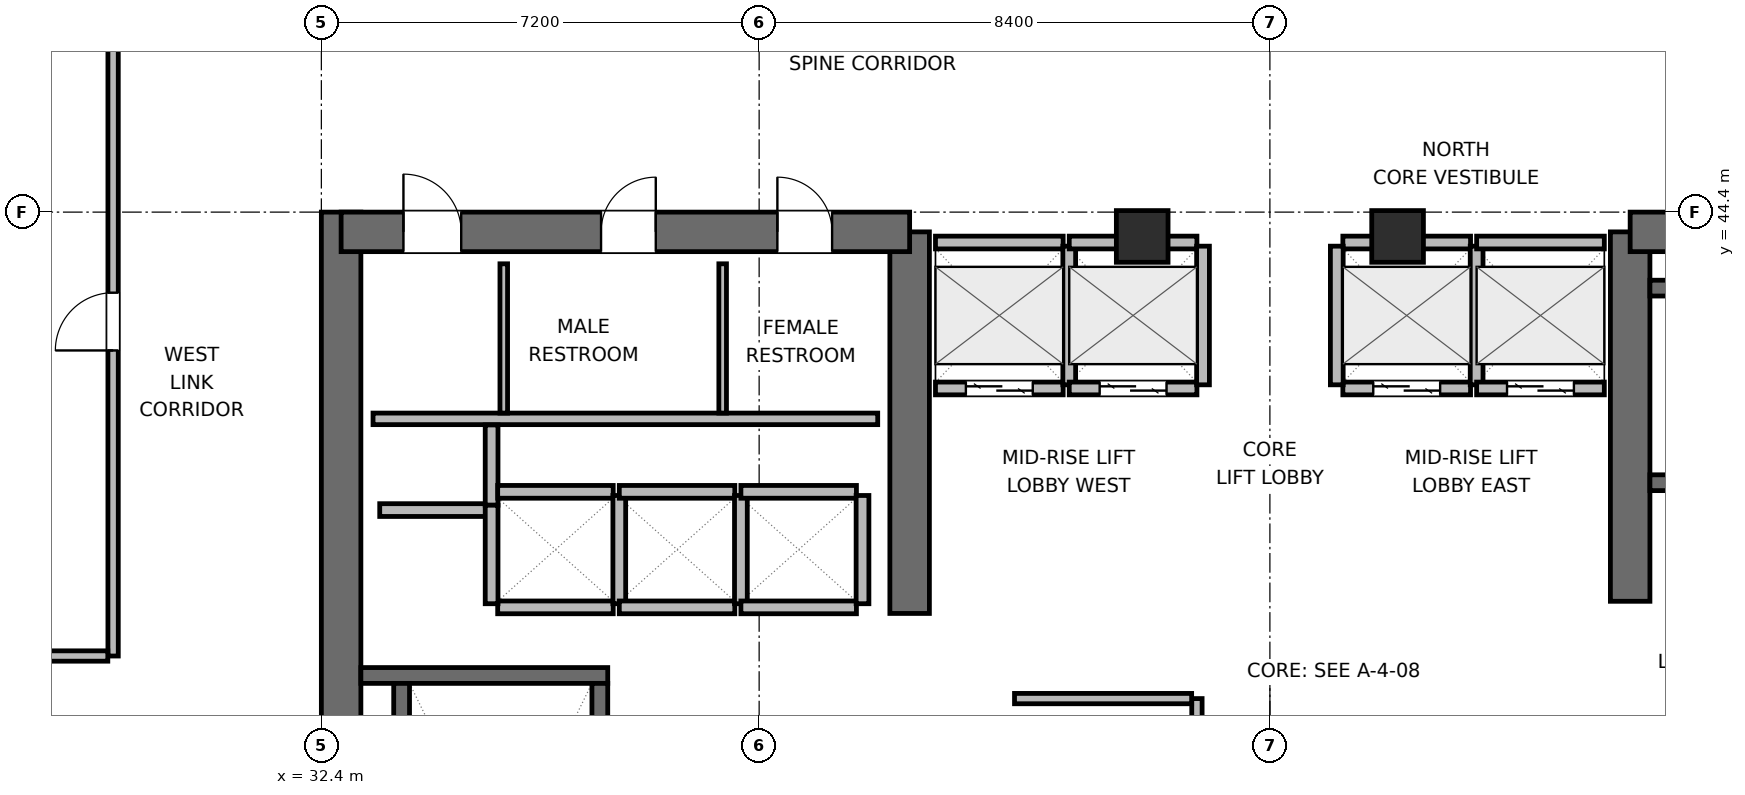
"""IFC4 building model, lengths in metres.
Left out: names, types, materials, properties, quantities, classifications, styles, units other than length and angle.
Written with IfcOpenShell. Run it as: python <this file> out.ifc"""

import sys

from ifc_helpers import new_model, si_unit, direction, frame, frame_2d, origin, origin_2d, place, context, subcontext, project, spatial, rectangle, extrude, element, fill, save


model = new_model("IFC4")
c1 = context("Model", 3, precision=1e-05, world=origin(), true_north=direction((0.0, 1.0)))
c2 = subcontext(c1, "Body", "Model", "MODEL_VIEW")
j1 = project(units=[si_unit("LENGTHUNIT", "METRE"), si_unit("PLANEANGLEUNIT", "RADIAN")], contexts=[c1])
p1 = place(None, origin())
s1 = spatial("IfcSite", under=j1, at=p1, CompositionType="ELEMENT")
p2 = place(p1, origin())
s2 = spatial("IfcBuilding", under=s1, at=p2, CompositionType="ELEMENT")
p3 = place(p2, frame((0.0, 0.0, 205.8)))
s3 = spatial("IfcBuildingStorey", under=s2, at=p3, CompositionType="ELEMENT", Elevation=205.8)
p4 = place(p3, frame((32.725, 27.6, 0.0), z_axis=(0.0, 0.0, 1.0), x_axis=(0.0, 1.0, 0.0)))
e1 = element("IfcWall", 1, at=p4, inside=s3, PredefinedType="SHEAR", context=c2, shape_type="SweptSolid", body=[
    extrude(rectangle(XDim=16.8, YDim=0.65, at=frame_2d((8.4, 0.0))), origin(), (0.0, 0.0, 1.0), 3.9),
])
p5 = place(p3, frame((42.075, 37.8, 0.0), z_axis=(0.0, 0.0, 1.0), x_axis=(0.0, 1.0, 0.0)))
e2 = element("IfcWall", 2, at=p5, inside=s3, PredefinedType="SHEAR", context=c2, shape_type="SweptSolid", body=[
    extrude(rectangle(XDim=6.275, YDim=0.65, at=frame_2d((3.137, 0.0))), origin(), (0.0, 0.0, 1.0), 3.9),
])
p6 = place(p3, frame((32.725, 44.075, 0.0), z_axis=(0.0, 0.0, 1.0), x_axis=(1.0, 0.0, 0.0)))
e3 = element("IfcWall", 3, at=p6, inside=s3, PredefinedType="SHEAR", context=c2, shape_type="SweptSolid", body=[
    extrude(rectangle(XDim=9.35, YDim=0.65, at=frame_2d((4.675, 0.0))), origin(), (0.0, 0.0, 1.0), 3.9),
])
p7 = place(p6, frame((1.025, 0.0, 0.0)))
e4 = element("IfcOpeningElement", 4, at=p7, cuts=e3, PredefinedType="OPENING", context=c2, shape_type="SweptSolid", body=[
    extrude(rectangle(XDim=0.95, YDim=2.04, at=frame_2d((0.475, 1.02))), frame((0.0, 0.335, 0.0), z_axis=(0.0, -1.0, 0.0), x_axis=(1.0, 0.0, 0.0)), (0.0, 0.0, 1.0), 0.67),
])
p8 = place(p6, frame((4.275, 0.0, 0.0)))
e5 = element("IfcOpeningElement", 5, at=p8, cuts=e3, PredefinedType="OPENING", context=c2, shape_type="SweptSolid", body=[
    extrude(rectangle(XDim=0.9, YDim=2.02, at=frame_2d((0.45, 1.01))), frame((0.0, 0.335, 0.0), z_axis=(0.0, -1.0, 0.0), x_axis=(1.0, 0.0, 0.0)), (0.0, 0.0, 1.0), 0.67),
])
p9 = place(p6, frame((7.175, 0.0, 0.0)))
e6 = element("IfcOpeningElement", 6, at=p9, cuts=e3, PredefinedType="OPENING", context=c2, shape_type="SweptSolid", body=[
    extrude(rectangle(XDim=0.9, YDim=2.02, at=frame_2d((0.45, 1.01))), frame((0.0, 0.335, 0.0), z_axis=(0.0, -1.0, 0.0), x_axis=(1.0, 0.0, 0.0)), (0.0, 0.0, 1.0), 0.67),
])
p10 = place(p3, frame((53.925, 38.0, 0.0), z_axis=(0.0, 0.0, 1.0), x_axis=(0.0, 1.0, 0.0)))
e7 = element("IfcWall", 7, at=p10, inside=s3, PredefinedType="SHEAR", context=c2, shape_type="SweptSolid", body=[
    extrude(rectangle(XDim=6.075, YDim=0.65, at=frame_2d((3.038, 0.0))), origin(), (0.0, 0.0, 1.0), 3.9),
])
p11 = place(p3, frame((53.925, 44.075, 0.0), z_axis=(0.0, 0.0, 1.0), x_axis=(1.0, 0.0, 0.0)))
e8 = element("IfcWall", 8, at=p11, inside=s3, PredefinedType="SHEAR", context=c2, shape_type="SweptSolid", body=[
    extrude(rectangle(XDim=9.35, YDim=0.65, at=frame_2d((4.675, 0.0))), origin(), (0.0, 0.0, 1.0), 3.9),
])
p12 = place(p3, frame((33.05, 36.78, 0.0), z_axis=(0.0, 0.0, 1.0), x_axis=(1.0, 0.0, 0.0)))
e9 = element("IfcWall", 9, at=p12, inside=s3, PredefinedType="SHEAR", context=c2, shape_type="SweptSolid", body=[
    extrude(rectangle(XDim=4.06, YDim=0.26, at=frame_2d((2.03, 0.0))), origin(), (0.0, 0.0, 1.0), 3.9),
])
p13 = place(p3, frame((33.72, 29.05, 0.0), z_axis=(0.0, 0.0, 1.0), x_axis=(0.0, 1.0, 0.0)))
e10 = element("IfcWall", 10, at=p13, inside=s3, PredefinedType="SHEAR", context=c2, shape_type="SweptSolid", body=[
    extrude(rectangle(XDim=7.6, YDim=0.26, at=frame_2d((3.8, 0.0))), origin(), (0.0, 0.0, 1.0), 3.9),
])
p14 = place(p3, frame((36.98, 29.05, 0.0), z_axis=(0.0, 0.0, 1.0), x_axis=(0.0, 1.0, 0.0)))
e11 = element("IfcWall", 11, at=p14, inside=s3, PredefinedType="SHEAR", context=c2, shape_type="SweptSolid", body=[
    extrude(rectangle(XDim=7.6, YDim=0.26, at=frame_2d((3.8, 0.0))), origin(), (0.0, 0.0, 1.0), 3.9),
])
p15 = place(p14, frame((0.3, 0.0, 0.0)))
e12 = element("IfcOpeningElement", 12, at=p15, cuts=e11, PredefinedType="OPENING", context=c2, shape_type="SweptSolid", body=[
    extrude(rectangle(XDim=1.0, YDim=2.04, at=frame_2d((0.5, 1.02))), frame((0.0, 0.14, 0.0), z_axis=(0.0, -1.0, 0.0), x_axis=(1.0, 0.0, 0.0)), (0.0, 0.0, 1.0), 0.28),
])
p16 = place(p3, frame((54.25, 39.95, 0.0), z_axis=(0.0, 0.0, 1.0), x_axis=(1.0, 0.0, 0.0)))
e13 = element("IfcWall", 13, at=p16, inside=s3, PredefinedType="SHEAR", context=c2, shape_type="SweptSolid", body=[
    extrude(rectangle(XDim=8.7, YDim=0.26, at=frame_2d((4.35, 0.0))), origin(), (0.0, 0.0, 1.0), 3.9),
])
p17 = place(p16, frame((0.95, 0.0, 0.0)))
e14 = element("IfcOpeningElement", 14, at=p17, cuts=e13, PredefinedType="OPENING", context=c2, shape_type="SweptSolid", body=[
    extrude(rectangle(XDim=1.0, YDim=2.04, at=frame_2d((0.5, 1.02))), frame((0.0, 0.14, 0.0), z_axis=(0.0, -1.0, 0.0), x_axis=(1.0, 0.0, 0.0)), (0.0, 0.0, 1.0), 0.28),
])
p18 = place(p3, frame((54.25, 43.15, 0.0), z_axis=(0.0, 0.0, 1.0), x_axis=(1.0, 0.0, 0.0)))
e15 = element("IfcWall", 15, at=p18, inside=s3, PredefinedType="SHEAR", context=c2, shape_type="SweptSolid", body=[
    extrude(rectangle(XDim=8.7, YDim=0.26, at=frame_2d((4.35, 0.0))), origin(), (0.0, 0.0, 1.0), 3.9),
])
for number, where, z_axis, x_axis in (
    (16, (45.9, 44.0, 0.0), (0.0, 0.0, 1.0), (1.0, 0.0, 0.0)),
    (17, (50.1, 44.0, 0.0), (0.0, 0.0, 1.0), (1.0, 0.0, 0.0)),
):
    element("IfcColumn", number, at=place(p3, frame(where, z_axis=z_axis, x_axis=x_axis)), inside=s3, PredefinedType="COLUMN", context=c2, shape_type="SweptSolid", body=[
        extrude(rectangle(XDim=0.85, YDim=0.85, at=origin_2d()), origin(), (0.0, 0.0, 1.0), 3.9),
    ])
p19 = place(p3, frame((33.25, 41.0, 0.0), z_axis=(0.0, 0.0, 1.0), x_axis=(1.0, 0.0, 0.0)))
e18 = element("IfcWall", 18, at=p19, inside=s3, PredefinedType="PLUMBINGWALL", context=c2, shape_type="SweptSolid", body=[
    extrude(rectangle(XDim=8.3, YDim=0.19, at=frame_2d((4.15, 0.0))), origin(), (0.0, 0.0, 1.0), 3.6),
])
for number, where, z_axis, x_axis in (
    (19, (35.4, 41.095, 0.0), (0.0, 0.0, 1.0), (0.0, 1.0, 0.0)),
    (20, (39.0, 41.095, 0.0), (0.0, 0.0, 1.0), (0.0, 1.0, 0.0)),
):
    element("IfcWall", number, at=place(p3, frame(where, z_axis=z_axis, x_axis=x_axis)), inside=s3, PredefinedType="PARTITIONING", context=c2, shape_type="SweptSolid", body=[
        extrude(rectangle(XDim=2.455, YDim=0.125, at=frame_2d((1.228, 0.0))), origin(), (0.0, 0.0, 1.0), 3.6),
    ])
p20 = place(p3, frame((33.36, 39.5, 0.0), z_axis=(0.0, 0.0, 1.0), x_axis=(1.0, 0.0, 0.0)))
e21 = element("IfcWall", 21, at=p20, inside=s3, PredefinedType="PARTITIONING", context=c2, shape_type="SweptSolid", body=[
    extrude(rectangle(XDim=1.86, YDim=0.21, at=frame_2d((0.93, 0.0))), origin(), (0.0, 0.0, 1.0), 3.6),
])
p21 = place(p3, frame((35.2, 39.58, 0.0), z_axis=(0.0, 0.0, 1.0), x_axis=(0.0, 1.0, 0.0)))
e22 = element("IfcWall", 22, at=p21, inside=s3, PredefinedType="PARTITIONING", context=c2, shape_type="SweptSolid", body=[
    extrude(rectangle(XDim=1.32, YDim=0.21, at=frame_2d((0.66, 0.0))), origin(), (0.0, 0.0, 1.0), 3.6),
])
p22 = place(p3, frame((42.5, 41.5, 0.0), z_axis=(0.0, 0.0, 1.0), x_axis=(1.0, 0.0, 0.0)))
e23 = element("IfcWall", 23, at=p22, inside=s3, PredefinedType="PARTITIONING", context=c2, shape_type="SweptSolid", body=[
    extrude(rectangle(XDim=2.1, YDim=0.21, at=frame_2d((1.05, 0.0))), origin(), (0.0, 0.0, 1.0), 3.6),
])
p23 = place(p22, frame((0.5, 0.0, 0.0)))
e24 = element("IfcOpeningElement", 24, at=p23, cuts=e23, PredefinedType="OPENING", context=c2, shape_type="SweptSolid", body=[
    extrude(rectangle(XDim=1.1, YDim=2.04, at=frame_2d((0.55, 1.02))), frame((0.0, 0.115, 0.0), z_axis=(0.0, -1.0, 0.0), x_axis=(1.0, 0.0, 0.0)), (0.0, 0.0, 1.0), 0.23),
])
p24 = place(p3, frame((42.5, 43.9, 0.0), z_axis=(0.0, 0.0, 1.0), x_axis=(1.0, 0.0, 0.0)))
e25 = element("IfcWall", 25, at=p24, inside=s3, PredefinedType="PARTITIONING", context=c2, shape_type="SweptSolid", body=[
    extrude(rectangle(XDim=2.1, YDim=0.21, at=frame_2d((1.05, 0.0))), origin(), (0.0, 0.0, 1.0), 2.685),
])
p25 = place(p3, frame((44.7, 41.56, 0.0), z_axis=(0.0, 0.0, 1.0), x_axis=(0.0, 1.0, 0.0)))
e26 = element("IfcWall", 26, at=p25, inside=s3, PredefinedType="PARTITIONING", context=c2, shape_type="SweptSolid", body=[
    extrude(rectangle(XDim=2.28, YDim=0.21, at=frame_2d((1.14, 0.0))), origin(), (0.0, 0.0, 1.0), 3.6),
])
p26 = place(p3, frame((44.7, 41.5, 0.0), z_axis=(0.0, 0.0, 1.0), x_axis=(1.0, 0.0, 0.0)))
e27 = element("IfcWall", 27, at=p26, inside=s3, PredefinedType="PARTITIONING", context=c2, shape_type="SweptSolid", body=[
    extrude(rectangle(XDim=2.1, YDim=0.21, at=frame_2d((1.05, 0.0))), origin(), (0.0, 0.0, 1.0), 3.6),
])
p27 = place(p26, frame((0.5, 0.0, 0.0)))
e28 = element("IfcOpeningElement", 28, at=p27, cuts=e27, PredefinedType="OPENING", context=c2, shape_type="SweptSolid", body=[
    extrude(rectangle(XDim=1.1, YDim=2.04, at=frame_2d((0.55, 1.02))), frame((0.0, 0.115, 0.0), z_axis=(0.0, -1.0, 0.0), x_axis=(1.0, 0.0, 0.0)), (0.0, 0.0, 1.0), 0.23),
])
p28 = place(p3, frame((44.7, 43.9, 0.0), z_axis=(0.0, 0.0, 1.0), x_axis=(1.0, 0.0, 0.0)))
e29 = element("IfcWall", 29, at=p28, inside=s3, PredefinedType="PARTITIONING", context=c2, shape_type="SweptSolid", body=[
    extrude(rectangle(XDim=2.1, YDim=0.21, at=frame_2d((1.05, 0.0))), origin(), (0.0, 0.0, 1.0), 2.685),
])
p29 = place(p3, frame((46.9, 41.56, 0.0), z_axis=(0.0, 0.0, 1.0), x_axis=(0.0, 1.0, 0.0)))
e30 = element("IfcWall", 30, at=p29, inside=s3, PredefinedType="PARTITIONING", context=c2, shape_type="SweptSolid", body=[
    extrude(rectangle(XDim=2.28, YDim=0.21, at=frame_2d((1.14, 0.0))), origin(), (0.0, 0.0, 1.0), 3.6),
])
p30 = place(p3, frame((49.2, 41.5, 0.0), z_axis=(0.0, 0.0, 1.0), x_axis=(1.0, 0.0, 0.0)))
e31 = element("IfcWall", 31, at=p30, inside=s3, PredefinedType="PARTITIONING", context=c2, shape_type="SweptSolid", body=[
    extrude(rectangle(XDim=2.1, YDim=0.21, at=frame_2d((1.05, 0.0))), origin(), (0.0, 0.0, 1.0), 3.6),
])
p31 = place(p30, frame((0.5, 0.0, 0.0)))
e32 = element("IfcOpeningElement", 32, at=p31, cuts=e31, PredefinedType="OPENING", context=c2, shape_type="SweptSolid", body=[
    extrude(rectangle(XDim=1.1, YDim=2.04, at=frame_2d((0.55, 1.02))), frame((0.0, 0.115, 0.0), z_axis=(0.0, -1.0, 0.0), x_axis=(1.0, 0.0, 0.0)), (0.0, 0.0, 1.0), 0.23),
])
p32 = place(p3, frame((49.2, 43.9, 0.0), z_axis=(0.0, 0.0, 1.0), x_axis=(1.0, 0.0, 0.0)))
e33 = element("IfcWall", 33, at=p32, inside=s3, PredefinedType="PARTITIONING", context=c2, shape_type="SweptSolid", body=[
    extrude(rectangle(XDim=2.1, YDim=0.21, at=frame_2d((1.05, 0.0))), origin(), (0.0, 0.0, 1.0), 2.685),
])
for number, where, z_axis, x_axis in (
    (34, (49.1, 41.56, 0.0), (0.0, 0.0, 1.0), (0.0, 1.0, 0.0)),
    (35, (51.4, 41.56, 0.0), (0.0, 0.0, 1.0), (0.0, 1.0, 0.0)),
):
    element("IfcWall", number, at=place(p3, frame(where, z_axis=z_axis, x_axis=x_axis)), inside=s3, PredefinedType="PARTITIONING", context=c2, shape_type="SweptSolid", body=[
        extrude(rectangle(XDim=2.28, YDim=0.21, at=frame_2d((1.14, 0.0))), origin(), (0.0, 0.0, 1.0), 3.6),
    ])
p33 = place(p3, frame((51.4, 41.5, 0.0), z_axis=(0.0, 0.0, 1.0), x_axis=(1.0, 0.0, 0.0)))
e36 = element("IfcWall", 36, at=p33, inside=s3, PredefinedType="PARTITIONING", context=c2, shape_type="SweptSolid", body=[
    extrude(rectangle(XDim=2.1, YDim=0.21, at=frame_2d((1.05, 0.0))), origin(), (0.0, 0.0, 1.0), 3.6),
])
p34 = place(p33, frame((0.5, 0.0, 0.0)))
e37 = element("IfcOpeningElement", 37, at=p34, cuts=e36, PredefinedType="OPENING", context=c2, shape_type="SweptSolid", body=[
    extrude(rectangle(XDim=1.1, YDim=2.04, at=frame_2d((0.55, 1.02))), frame((0.0, 0.115, 0.0), z_axis=(0.0, -1.0, 0.0), x_axis=(1.0, 0.0, 0.0)), (0.0, 0.0, 1.0), 0.23),
])
p35 = place(p3, frame((51.4, 43.9, 0.0), z_axis=(0.0, 0.0, 1.0), x_axis=(1.0, 0.0, 0.0)))
e38 = element("IfcWall", 38, at=p35, inside=s3, PredefinedType="PARTITIONING", context=c2, shape_type="SweptSolid", body=[
    extrude(rectangle(XDim=2.1, YDim=0.21, at=frame_2d((1.05, 0.0))), origin(), (0.0, 0.0, 1.0), 2.685),
])
for number, where, z_axis, x_axis in (
    (39, (35.3, 37.9, 0.0), (0.0, 0.0, 1.0), (1.0, 0.0, 0.0)),
    (40, (35.3, 39.8, 0.0), (0.0, 0.0, 1.0), (1.0, 0.0, 0.0)),
):
    element("IfcWall", number, at=place(p3, frame(where, z_axis=z_axis, x_axis=x_axis)), inside=s3, PredefinedType="PARTITIONING", context=c2, shape_type="SweptSolid", body=[
        extrude(rectangle(XDim=1.9, YDim=0.21, at=frame_2d((0.95, 0.0))), origin(), (0.0, 0.0, 1.0), 3.6),
    ])
p36 = place(p3, frame((35.2, 37.96, 0.0), z_axis=(0.0, 0.0, 1.0), x_axis=(0.0, 1.0, 0.0)))
e41 = element("IfcWall", 41, at=p36, inside=s3, PredefinedType="PARTITIONING", context=c2, shape_type="SweptSolid", body=[
    extrude(rectangle(XDim=1.62, YDim=0.21, at=frame_2d((0.81, 0.0))), origin(), (0.0, 0.0, 1.0), 3.6),
])
p37 = place(p3, frame((37.3, 37.96, 0.0), z_axis=(0.0, 0.0, 1.0), x_axis=(0.0, 1.0, 0.0)))
e42 = element("IfcWall", 42, at=p37, inside=s3, PredefinedType="PARTITIONING", context=c2, shape_type="SweptSolid", body=[
    extrude(rectangle(XDim=1.78, YDim=0.21, at=frame_2d((0.89, 0.0))), origin(), (0.0, 0.0, 1.0), 3.6),
])
for number, where, z_axis, x_axis in (
    (43, (37.3, 37.9, 0.0), (0.0, 0.0, 1.0), (1.0, 0.0, 0.0)),
    (44, (37.3, 39.8, 0.0), (0.0, 0.0, 1.0), (1.0, 0.0, 0.0)),
):
    element("IfcWall", number, at=place(p3, frame(where, z_axis=z_axis, x_axis=x_axis)), inside=s3, PredefinedType="PARTITIONING", context=c2, shape_type="SweptSolid", body=[
        extrude(rectangle(XDim=1.9, YDim=0.21, at=frame_2d((0.95, 0.0))), origin(), (0.0, 0.0, 1.0), 3.6),
    ])
p38 = place(p3, frame((39.3, 37.96, 0.0), z_axis=(0.0, 0.0, 1.0), x_axis=(0.0, 1.0, 0.0)))
e45 = element("IfcWall", 45, at=p38, inside=s3, PredefinedType="PARTITIONING", context=c2, shape_type="SweptSolid", body=[
    extrude(rectangle(XDim=1.78, YDim=0.21, at=frame_2d((0.89, 0.0))), origin(), (0.0, 0.0, 1.0), 3.6),
])
for number, where, z_axis, x_axis in (
    (46, (39.3, 37.9, 0.0), (0.0, 0.0, 1.0), (1.0, 0.0, 0.0)),
    (47, (39.3, 39.8, 0.0), (0.0, 0.0, 1.0), (1.0, 0.0, 0.0)),
):
    element("IfcWall", number, at=place(p3, frame(where, z_axis=z_axis, x_axis=x_axis)), inside=s3, PredefinedType="PARTITIONING", context=c2, shape_type="SweptSolid", body=[
        extrude(rectangle(XDim=1.9, YDim=0.21, at=frame_2d((0.95, 0.0))), origin(), (0.0, 0.0, 1.0), 3.6),
    ])
p39 = place(p3, frame((41.3, 37.96, 0.0), z_axis=(0.0, 0.0, 1.0), x_axis=(0.0, 1.0, 0.0)))
e48 = element("IfcWall", 48, at=p39, inside=s3, PredefinedType="PARTITIONING", context=c2, shape_type="SweptSolid", body=[
    extrude(rectangle(XDim=1.78, YDim=0.21, at=frame_2d((0.89, 0.0))), origin(), (0.0, 0.0, 1.0), 3.6),
])
p40 = place(p3, frame((46.8, 32.6, 0.0), z_axis=(0.0, 0.0, 1.0), x_axis=(0.0, 1.0, 0.0)))
e49 = element("IfcWall", 49, at=p40, inside=s3, PredefinedType="PARTITIONING", context=c2, shape_type="SweptSolid", body=[
    extrude(rectangle(XDim=3.8, YDim=0.17, at=frame_2d((1.9, 0.0))), origin(), (0.0, 0.0, 1.0), 3.6),
])
p41 = place(p40, frame((1.45, 0.0, 0.0)))
e50 = element("IfcOpeningElement", 50, at=p41, cuts=e49, PredefinedType="OPENING", context=c2, shape_type="SweptSolid", body=[
    extrude(rectangle(XDim=0.9, YDim=2.02, at=frame_2d((0.45, 1.01))), frame((0.0, 0.095, 0.0), z_axis=(0.0, -1.0, 0.0), x_axis=(1.0, 0.0, 0.0)), (0.0, 0.0, 1.0), 0.19),
])
p42 = place(p3, frame((43.8, 36.4, 0.0), z_axis=(0.0, 0.0, 1.0), x_axis=(1.0, 0.0, 0.0)))
e51 = element("IfcWall", 51, at=p42, inside=s3, PredefinedType="PARTITIONING", context=c2, shape_type="SweptSolid", body=[
    extrude(rectangle(XDim=2.913, YDim=0.17, at=frame_2d((1.457, 0.0))), origin(), (0.0, 0.0, 1.0), 3.6),
])
p43 = place(p3, frame((28.975, 37.1, 0.0), z_axis=(0.0, 0.0, 1.0), x_axis=(0.0, 1.0, 0.0)))
e52 = element("IfcWall", 52, at=p43, inside=s3, PredefinedType="PARTITIONING", context=c2, shape_type="SweptSolid", body=[
    extrude(rectangle(XDim=10.913, YDim=0.17, at=frame_2d((5.457, 0.0))), origin(), (0.0, 0.0, 1.0), 3.6),
])
p44 = place(p43, frame((5.025, 0.0, 0.0)))
e53 = element("IfcOpeningElement", 53, at=p44, cuts=e52, PredefinedType="OPENING", context=c2, shape_type="SweptSolid", body=[
    extrude(rectangle(XDim=0.95, YDim=2.04, at=frame_2d((0.475, 1.02))), frame((0.0, 0.095, 0.0), z_axis=(0.0, -1.0, 0.0), x_axis=(1.0, 0.0, 0.0)), (0.0, 0.0, 1.0), 0.19),
])
p45 = place(p3, frame((18.225, 37.1, 0.0), z_axis=(0.0, 0.0, 1.0), x_axis=(1.0, 0.0, 0.0)))
e54 = element("IfcWall", 54, at=p45, inside=s3, PredefinedType="PARTITIONING", context=c2, shape_type="SweptSolid", body=[
    extrude(rectangle(XDim=10.663, YDim=0.17, at=frame_2d((5.332, 0.0))), origin(), (0.0, 0.0, 1.0), 3.6),
])
p46 = place(p23, origin())
e55 = element("IfcDoor", 55, at=p46, inside=s3, OperationType="DOUBLE_DOOR_SLIDING", PredefinedType="DOOR", context=c2, shape_type="SweptSolid", body=[
    extrude(rectangle(XDim=1.1, YDim=2.04, at=frame_2d((0.55, 1.02))), frame((0.0, 0.025, 0.0), z_axis=(0.0, -1.0, 0.0), x_axis=(1.0, 0.0, 0.0)), (0.0, 0.0, 1.0), 0.05),
])
fill(e24, e55)
p47 = place(p27, origin())
e56 = element("IfcDoor", 56, at=p47, inside=s3, OperationType="DOUBLE_DOOR_SLIDING", PredefinedType="DOOR", context=c2, shape_type="SweptSolid", body=[
    extrude(rectangle(XDim=1.1, YDim=2.04, at=frame_2d((0.55, 1.02))), frame((0.0, 0.025, 0.0), z_axis=(0.0, -1.0, 0.0), x_axis=(1.0, 0.0, 0.0)), (0.0, 0.0, 1.0), 0.05),
])
fill(e28, e56)
p48 = place(p31, origin())
e57 = element("IfcDoor", 57, at=p48, inside=s3, OperationType="DOUBLE_DOOR_SLIDING", PredefinedType="DOOR", context=c2, shape_type="SweptSolid", body=[
    extrude(rectangle(XDim=1.1, YDim=2.04, at=frame_2d((0.55, 1.02))), frame((0.0, 0.025, 0.0), z_axis=(0.0, -1.0, 0.0), x_axis=(1.0, 0.0, 0.0)), (0.0, 0.0, 1.0), 0.05),
])
fill(e32, e57)
p49 = place(p34, origin())
e58 = element("IfcDoor", 58, at=p49, inside=s3, OperationType="DOUBLE_DOOR_SLIDING", PredefinedType="DOOR", context=c2, shape_type="SweptSolid", body=[
    extrude(rectangle(XDim=1.1, YDim=2.04, at=frame_2d((0.55, 1.02))), frame((0.0, 0.025, 0.0), z_axis=(0.0, -1.0, 0.0), x_axis=(1.0, 0.0, 0.0)), (0.0, 0.0, 1.0), 0.05),
])
fill(e37, e58)
p50 = place(p7, origin())
e59 = element("IfcDoor", 59, at=p50, inside=s3, OperationType="SINGLE_SWING_LEFT", PredefinedType="DOOR", context=c2, shape_type="SweptSolid", body=[
    extrude(rectangle(XDim=0.95, YDim=2.04, at=frame_2d((0.475, 1.02))), frame((0.0, 0.025, 0.0), z_axis=(0.0, -1.0, 0.0), x_axis=(1.0, 0.0, 0.0)), (0.0, 0.0, 1.0), 0.05),
])
fill(e4, e59)
p51 = place(p8, origin())
e60 = element("IfcDoor", 60, at=p51, inside=s3, OperationType="SINGLE_SWING_RIGHT", PredefinedType="DOOR", context=c2, shape_type="SweptSolid", body=[
    extrude(rectangle(XDim=0.9, YDim=2.02, at=frame_2d((0.45, 1.01))), frame((0.0, 0.025, 0.0), z_axis=(0.0, -1.0, 0.0), x_axis=(1.0, 0.0, 0.0)), (0.0, 0.0, 1.0), 0.05),
])
fill(e5, e60)
p52 = place(p9, origin())
e61 = element("IfcDoor", 61, at=p52, inside=s3, OperationType="SINGLE_SWING_LEFT", PredefinedType="DOOR", context=c2, shape_type="SweptSolid", body=[
    extrude(rectangle(XDim=0.9, YDim=2.02, at=frame_2d((0.45, 1.01))), frame((0.0, 0.025, 0.0), z_axis=(0.0, -1.0, 0.0), x_axis=(1.0, 0.0, 0.0)), (0.0, 0.0, 1.0), 0.05),
])
fill(e6, e61)
p53 = place(p44, origin())
e62 = element("IfcDoor", 62, at=p53, inside=s3, OperationType="SINGLE_SWING_LEFT", PredefinedType="DOOR", context=c2, shape_type="SweptSolid", body=[
    extrude(rectangle(XDim=0.95, YDim=2.04, at=frame_2d((0.475, 1.02))), frame((0.0, 0.025, 0.0), z_axis=(0.0, -1.0, 0.0), x_axis=(1.0, 0.0, 0.0)), (0.0, 0.0, 1.0), 0.05),
])
fill(e53, e62)
save(model, sys.argv[1])
